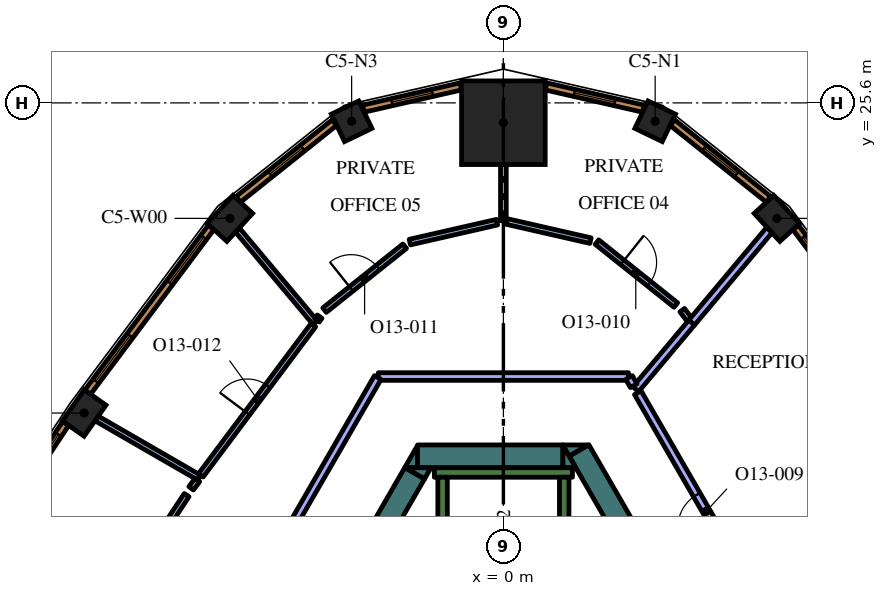
"""IFC4 building model, lengths in metres.
Left out: names, types, materials, properties, quantities, classifications, styles, units other than length and angle.
Written with IfcOpenShell. Run it as: python <this file> out.ifc"""

import sys

from ifc_helpers import new_model, si_unit, direction, frame, frame_2d, origin, origin_2d, place, context, subcontext, project, spatial, polyline, rectangle, outline, extrude, element, fill, save


model = new_model("IFC4")
c1 = context("Model", 3, precision=1e-05, world=origin(), true_north=direction((0.0, 1.0)))
c2 = subcontext(c1, "Body", "Model", "MODEL_VIEW")
j1 = project(units=[si_unit("LENGTHUNIT", "METRE"), si_unit("PLANEANGLEUNIT", "RADIAN")], contexts=[c1])
p1 = place(None, origin())
s1 = spatial("IfcSite", under=j1, at=p1, CompositionType="ELEMENT")
p2 = place(p1, origin())
s2 = spatial("IfcBuilding", under=s1, at=p2, CompositionType="ELEMENT")
p3 = place(p2, frame((0.0, 0.0, 292.2)))
s3 = spatial("IfcBuildingStorey", under=s2, at=p3, CompositionType="ELEMENT", Elevation=292.2)
p4 = place(p3, frame((0.0, 25.078, 0.0), z_axis=(0.0, 0.0, 1.0), x_axis=(0.0, 1.0, 0.0)))
e1 = element("IfcColumn", 1, at=p4, inside=s3, PredefinedType="COLUMN", context=c2, shape_type="SweptSolid", body=[
    extrude(rectangle(XDim=2.2, YDim=2.2, at=origin_2d()), origin(), (0.0, 0.0, 1.0), 4.2),
])
p5 = place(p3, frame((7.195, 22.561, 0.0), z_axis=(0.0, 0.0, 1.0), x_axis=(-0.67580250023, 0.737082750228, 0.0)))
e2 = element("IfcColumn", 2, at=p5, inside=s3, PredefinedType="COLUMN", context=c2, shape_type="SweptSolid", body=[
    extrude(rectangle(XDim=1.0, YDim=0.7, at=origin_2d()), origin(), (0.0, 0.0, 1.0), 4.2),
])
for number, where, z_axis, x_axis in (
    (3, (3.993, 25.116, 0.0), (0.0, 0.0, 1.0), (-0.901, 0.434, 0.0)),
    (4, (-3.993, 25.116, 0.0), (0.0, 0.0, 1.0), (-0.901, -0.434, 0.0)),
):
    element("IfcColumn", number, at=place(p3, frame(where, z_axis=z_axis, x_axis=x_axis)), inside=s3, PredefinedType="COLUMN", context=c2, shape_type="SweptSolid", body=[
        extrude(rectangle(XDim=0.8, YDim=0.8, at=origin_2d()), origin(), (0.0, 0.0, 1.0), 4.2),
    ])
for number, where, z_axis, x_axis in (
    (5, (-7.195, 22.561, 0.0), (0.0, 0.0, 1.0), (-0.676, -0.737, 0.0)),
    (6, (-11.032, 17.44, 0.0), (0.0, 0.0, 1.0), (-0.575, -0.818, 0.0)),
):
    element("IfcColumn", number, at=place(p3, frame(where, z_axis=z_axis, x_axis=x_axis)), inside=s3, PredefinedType="COLUMN", context=c2, shape_type="SweptSolid", body=[
        extrude(rectangle(XDim=1.0, YDim=0.7, at=origin_2d()), origin(), (0.0, 0.0, 1.0), 4.2),
    ])
p6 = place(p3, frame((1.989, 16.456, 0.0), z_axis=(0.0, 0.0, 1.0), x_axis=(0.49999102663, -0.8660305845, 0.0)))
e7 = element("IfcWall", 7, at=p6, inside=s3, PredefinedType="SOLIDWALL", context=c2, shape_type="SweptSolid", body=[
    extrude(rectangle(XDim=12.406, YDim=0.6, at=frame_2d((6.203, 0.0))), origin(), (0.0, 0.0, 1.0), 4.2),
])
p7 = place(p3, origin())
e8 = element("IfcWall", 8, at=p7, inside=s3, PredefinedType="SOLIDWALL", context=c2, shape_type="SweptSolid", body=[
    extrude(outline(polyline([(1.559, 16.6), (2.235, 16.6), (1.728, 16.307), (1.559, 16.6)])), origin(), (0.0, 0.0, 1.0), 4.2),
])
p8 = place(p3, frame((-2.258, 16.3, 0.0), z_axis=(0.0, 0.0, 1.0), x_axis=(1.0, 0.0, 0.0)))
e9 = element("IfcWall", 9, at=p8, inside=s3, PredefinedType="SOLIDWALL", context=c2, shape_type="SweptSolid", body=[
    extrude(rectangle(XDim=3.823, YDim=0.6, at=frame_2d((1.912, 0.0))), origin(), (0.0, 0.0, 1.0), 4.2),
])
e10 = element("IfcWall", 10, at=p7, inside=s3, PredefinedType="SOLIDWALL", context=c2, shape_type="SweptSolid", body=[
    extrude(outline(polyline([(1.905, 16.0), (1.567, 16.0), (1.567, 16.585), (1.905, 16.0)])), origin(), (0.0, 0.0, 1.0), 4.2),
])
e11 = element("IfcWall", 11, at=p7, inside=s3, PredefinedType="SOLIDWALL", context=c2, shape_type="SweptSolid", body=[
    extrude(outline(polyline([(-2.598, 16.0), (-2.26, 16.585), (-2.26, 16.0), (-2.598, 16.0)])), origin(), (0.0, 0.0, 1.0), 4.2),
])
p9 = place(p3, frame((-2.335, 15.855, 0.0), z_axis=(0.0, 0.0, 1.0), x_axis=(-0.499960127962, -0.866048422692, 0.0)))
e12 = element("IfcWall", 12, at=p9, inside=s3, PredefinedType="SOLIDWALL", context=c2, shape_type="SweptSolid", body=[
    extrude(rectangle(XDim=2.934, YDim=0.6, at=frame_2d((1.467, 0.0))), origin(), (0.0, 0.0, 1.0), 4.2),
])
e13 = element("IfcWall", 13, at=p7, inside=s3, PredefinedType="SOLIDWALL", context=c2, shape_type="SweptSolid", body=[
    extrude(outline(polyline([(-1.905, 16.0), (-2.074, 15.707), (-2.581, 16.0), (-1.905, 16.0)])), origin(), (0.0, 0.0, 1.0), 4.2),
])
p10 = place(p3, frame((-1.817, 15.875, 0.0), z_axis=(0.0, 0.0, 1.0), x_axis=(1.0, 0.0, 0.0)))
e14 = element("IfcWall", 14, at=p10, inside=s3, PredefinedType="SOLIDWALL", context=c2, shape_type="SweptSolid", body=[
    extrude(rectangle(XDim=3.634, YDim=0.25, at=frame_2d((1.817, 0.0))), origin(), (0.0, 0.0, 1.0), 4.2),
])
p11 = place(p3, frame((1.6, 8.95, 0.0), z_axis=(0.0, 0.0, 1.0), x_axis=(0.0, 1.0, 0.0)))
e15 = element("IfcWall", 15, at=p11, inside=s3, PredefinedType="SOLIDWALL", context=c2, shape_type="SweptSolid", body=[
    extrude(rectangle(XDim=6.8, YDim=0.25, at=frame_2d((3.4, 0.0))), origin(), (0.0, 0.0, 1.0), 4.2),
])
p12 = place(p3, frame((-1.6, 8.7, 0.0), z_axis=(0.0, 0.0, 1.0), x_axis=(0.0, 1.0, 0.0)))
e16 = element("IfcWall", 16, at=p12, inside=s3, PredefinedType="SOLIDWALL", context=c2, shape_type="SweptSolid", body=[
    extrude(rectangle(XDim=7.05, YDim=0.25, at=frame_2d((3.525, 0.0))), origin(), (0.0, 0.0, 1.0), 4.2),
])
p13 = place(p3, frame((4.95, 19.814, 0.0), z_axis=(0.0, 0.0, 1.0), x_axis=(0.642981953866, 0.765881326971, 0.0)))
e17 = element("IfcWall", 17, at=p13, inside=s3, PredefinedType="PARTITIONING", context=c2, shape_type="SweptSolid", body=[
    extrude(rectangle(XDim=3.188, YDim=0.2, at=frame_2d((1.594, 0.0))), origin(), (0.0, 0.0, 1.0), 3.55),
])
p14 = place(p3, frame((3.483, 18.067, 0.0), z_axis=(0.0, 0.0, 1.0), x_axis=(0.642896944312, 0.765952687177, 0.0)))
e18 = element("IfcWall", 18, at=p14, inside=s3, PredefinedType="PARTITIONING", context=c2, shape_type="SweptSolid", body=[
    extrude(rectangle(XDim=2.29, YDim=0.2, at=frame_2d((1.145, 0.0))), origin(), (0.0, 0.0, 1.0), 3.55),
])
p15 = place(p3, frame((7.188, 11.65, 0.0), z_axis=(0.0, 0.0, 1.0), x_axis=(-0.499989634868, 0.866031388014, 0.0)))
e19 = element("IfcWall", 19, at=p15, inside=s3, PredefinedType="PARTITIONING", context=c2, shape_type="SweptSolid", body=[
    extrude(rectangle(XDim=7.303, YDim=0.2, at=frame_2d((3.652, 0.0))), origin(), (0.0, 0.0, 1.0), 3.55),
])
p16 = place(p15, frame((3.2, 0.0, 0.0)))
e20 = element("IfcOpeningElement", 20, at=p16, cuts=e19, PredefinedType="OPENING", context=c2, shape_type="SweptSolid", body=[
    extrude(rectangle(XDim=1.0, YDim=2.1, at=frame_2d((0.5, 1.05))), frame((0.0, 0.11, 0.0), z_axis=(0.0, -1.0, 0.0), x_axis=(1.0, 0.0, 0.0)), (0.0, 0.0, 1.0), 0.22),
])
p17 = place(p3, frame((0.0, 22.5, 0.0), z_axis=(0.0, 0.0, 1.0), x_axis=(0.0, 1.0, 0.0)))
e21 = element("IfcWall", 21, at=p17, inside=s3, PredefinedType="PARTITIONING", context=c2, shape_type="SweptSolid", body=[
    extrude(rectangle(XDim=1.479, YDim=0.15, at=frame_2d((0.739, 0.0))), origin(), (0.0, 0.0, 1.0), 3.55),
])
p18 = place(p3, frame((4.891, 19.899, 0.0), z_axis=(0.0, 0.0, 1.0), x_axis=(-0.6, 0.8, 0.0)))
e22 = element("IfcWall", 22, at=p18, inside=s3, PredefinedType="PARTITIONING", context=c2, shape_type="SweptSolid", body=[
    extrude(rectangle(XDim=0.309, YDim=0.15, at=frame_2d((0.154, 0.0))), origin(), (0.0, 0.0, 1.0), 3.55),
])
p19 = place(p3, frame((2.462, 21.937, 0.0), z_axis=(0.0, 0.0, 1.0), x_axis=(0.781630346222, -0.62374193531, 0.0)))
e23 = element("IfcWall", 23, at=p19, inside=s3, PredefinedType="PARTITIONING", context=c2, shape_type="SweptSolid", body=[
    extrude(rectangle(XDim=2.656, YDim=0.15, at=frame_2d((1.328, 0.0))), origin(), (0.0, 0.0, 1.0), 3.55),
])
p20 = place(p19, frame((0.857, 0.0, 0.0)))
e24 = element("IfcOpeningElement", 24, at=p20, cuts=e23, PredefinedType="OPENING", context=c2, shape_type="SweptSolid", body=[
    extrude(rectangle(XDim=0.9, YDim=2.1, at=frame_2d((0.45, 1.05))), frame((0.0, 0.085, 0.0), z_axis=(0.0, -1.0, 0.0), x_axis=(1.0, 0.0, 0.0)), (0.0, 0.0, 1.0), 0.17),
])
p21 = place(p3, frame((2.293, 21.976, 0.0), z_axis=(0.0, 0.0, 1.0), x_axis=(-0.974905760283, 0.22261796551, 0.0)))
e25 = element("IfcWall", 25, at=p21, inside=s3, PredefinedType="PARTITIONING", context=c2, shape_type="SweptSolid", body=[
    extrude(rectangle(XDim=2.276, YDim=0.15, at=frame_2d((1.138, 0.0))), origin(), (0.0, 0.0, 1.0), 3.55),
])
p22 = place(p3, frame((-4.952, 19.817, 0.0), z_axis=(0.0, 0.0, 1.0), x_axis=(-0.643023053688, 0.765846820471, 0.0)))
e26 = element("IfcWall", 26, at=p22, inside=s3, PredefinedType="PARTITIONING", context=c2, shape_type="SweptSolid", body=[
    extrude(rectangle(XDim=3.184, YDim=0.15, at=frame_2d((1.592, 0.0))), origin(), (0.0, 0.0, 1.0), 3.55),
])
p23 = place(p3, frame((-0.168, 22.461, 0.0), z_axis=(0.0, 0.0, 1.0), x_axis=(-0.974885550769, -0.222706450069, 0.0)))
e27 = element("IfcWall", 27, at=p23, inside=s3, PredefinedType="PARTITIONING", context=c2, shape_type="SweptSolid", body=[
    extrude(rectangle(XDim=2.353, YDim=0.15, at=frame_2d((1.176, 0.0))), origin(), (0.0, 0.0, 1.0), 3.55),
])
p24 = place(p3, frame((-4.706, 20.146, 0.0), z_axis=(0.0, 0.0, 1.0), x_axis=(0.781592149204, 0.623789798172, 0.0)))
e28 = element("IfcWall", 28, at=p24, inside=s3, PredefinedType="PARTITIONING", context=c2, shape_type="SweptSolid", body=[
    extrude(rectangle(XDim=2.698, YDim=0.15, at=frame_2d((1.349, 0.0))), origin(), (0.0, 0.0, 1.0), 3.55),
])
p25 = place(p24, frame((0.898, 0.0, 0.0)))
e29 = element("IfcOpeningElement", 29, at=p25, cuts=e28, PredefinedType="OPENING", context=c2, shape_type="SweptSolid", body=[
    extrude(rectangle(XDim=0.9, YDim=2.1, at=frame_2d((0.45, 1.05))), frame((0.0, 0.085, 0.0), z_axis=(0.0, -1.0, 0.0), x_axis=(1.0, 0.0, 0.0)), (0.0, 0.0, 1.0), 0.17),
])
p26 = place(p3, frame((-4.834, 19.975, 0.0), z_axis=(0.0, 0.0, 1.0), x_axis=(-0.599349659863, -0.800487342325, 0.0)))
e30 = element("IfcWall", 30, at=p26, inside=s3, PredefinedType="PARTITIONING", context=c2, shape_type="SweptSolid", body=[
    extrude(rectangle(XDim=0.12, YDim=0.15, at=frame_2d((0.06, 0.0))), origin(), (0.0, 0.0, 1.0), 3.55),
])
p27 = place(p3, frame((-8.007, 15.74, 0.0), z_axis=(0.0, 0.0, 1.0), x_axis=(-0.866044607523, 0.499966736674, 0.0)))
e31 = element("IfcWall", 31, at=p27, inside=s3, PredefinedType="PARTITIONING", context=c2, shape_type="SweptSolid", body=[
    extrude(rectangle(XDim=3.115, YDim=0.15, at=frame_2d((1.557, 0.0))), origin(), (0.0, 0.0, 1.0), 3.55),
])
p28 = place(p3, frame((-7.962, 15.8, 0.0), z_axis=(0.0, 0.0, 1.0), x_axis=(0.599541489613, 0.800343677574, 0.0)))
e32 = element("IfcWall", 32, at=p28, inside=s3, PredefinedType="PARTITIONING", context=c2, shape_type="SweptSolid", body=[
    extrude(rectangle(XDim=4.942, YDim=0.15, at=frame_2d((2.471, 0.0))), origin(), (0.0, 0.0, 1.0), 3.55),
])
p29 = place(p28, frame((2.042, 0.0, 0.0)))
e33 = element("IfcOpeningElement", 33, at=p29, cuts=e32, PredefinedType="OPENING", context=c2, shape_type="SweptSolid", body=[
    extrude(rectangle(XDim=0.9, YDim=2.1, at=frame_2d((0.45, 1.05))), frame((0.0, 0.085, 0.0), z_axis=(0.0, -1.0, 0.0), x_axis=(1.0, 0.0, 0.0)), (0.0, 0.0, 1.0), 0.17),
])
p30 = place(p3, frame((-8.052, 15.679, 0.0), z_axis=(0.0, 0.0, 1.0), x_axis=(-0.599004157744, -0.800745914136, 0.0)))
e34 = element("IfcWall", 34, at=p30, inside=s3, PredefinedType="PARTITIONING", context=c2, shape_type="SweptSolid", body=[
    extrude(rectangle(XDim=0.275, YDim=0.15, at=frame_2d((0.137, 0.0))), origin(), (0.0, 0.0, 1.0), 3.55),
])
p31 = place(p3, frame((-11.523, 10.449, 0.0), z_axis=(0.0, 0.0, 1.0), x_axis=(0.550751709023, 0.834669129061, 0.0)))
e35 = element("IfcWall", 35, at=p31, inside=s3, PredefinedType="PARTITIONING", context=c2, shape_type="SweptSolid", body=[
    extrude(rectangle(XDim=5.788, YDim=0.15, at=frame_2d((2.894, 0.0))), origin(), (0.0, 0.0, 1.0), 3.55),
])
p32 = place(p31, frame((2.488, 0.0, 0.0)))
e36 = element("IfcOpeningElement", 36, at=p32, cuts=e35, PredefinedType="OPENING", context=c2, shape_type="SweptSolid", body=[
    extrude(rectangle(XDim=0.9, YDim=2.1, at=frame_2d((0.45, 1.05))), frame((0.0, 0.085, 0.0), z_axis=(0.0, -1.0, 0.0), x_axis=(1.0, 0.0, 0.0)), (0.0, 0.0, 1.0), 0.17),
])
p33 = place(p3, frame((3.291, 18.4, 0.0), z_axis=(0.0, 0.0, 1.0), x_axis=(-1.0, 0.0, 0.0)))
e37 = element("IfcWall", 37, at=p33, inside=s3, PredefinedType="PARTITIONING", context=c2, shape_type="SweptSolid", body=[
    extrude(rectangle(XDim=6.582, YDim=0.2, at=frame_2d((3.291, 0.0))), origin(), (0.0, 0.0, 1.0), 3.55),
])
p34 = place(p3, frame((-3.306, 18.374, 0.0), z_axis=(0.0, 0.0, 1.0), x_axis=(-0.499999798456, -0.866025520146, 0.0)))
e38 = element("IfcWall", 38, at=p34, inside=s3, PredefinedType="PARTITIONING", context=c2, shape_type="SweptSolid", body=[
    extrude(rectangle(XDim=8.229, YDim=0.2, at=frame_2d((4.115, 0.0))), origin(), (0.0, 0.0, 1.0), 3.55),
])
p35 = place(p3, frame((3.43, 18.159, 0.0), z_axis=(0.0, 0.0, 1.0), x_axis=(-0.499949632511, 0.866054481515, 0.0)))
e39 = element("IfcWall", 39, at=p35, inside=s3, PredefinedType="PARTITIONING", context=c2, shape_type="SweptSolid", body=[
    extrude(rectangle(XDim=0.248, YDim=0.2, at=frame_2d((0.124, 0.0))), origin(), (0.0, 0.0, 1.0), 3.55),
])
p36 = place(p3, frame((10.938, 17.99, 0.0), z_axis=(0.0, 0.0, 1.0), x_axis=(-0.599559865294, 0.800329911929, 0.0)))
e40 = element("IfcWall", 40, at=p36, inside=s3, PredefinedType="SOLIDWALL", context=c2, shape_type="SweptSolid", body=[
    extrude(rectangle(XDim=5.415, YDim=0.19, at=frame_2d((2.708, 0.0))), origin(), (0.0, 0.0, 1.0), 3.95),
])
p37 = place(p36, frame((0.358, 0.0, 0.6)))
e41 = element("IfcOpeningElement", 41, at=p37, cuts=e40, PredefinedType="OPENING", context=c2, shape_type="SweptSolid", body=[
    extrude(rectangle(XDim=1.5, YDim=2.85, at=frame_2d((0.75, 1.425))), frame((0.0, 0.105, 0.0), z_axis=(0.0, -1.0, 0.0), x_axis=(1.0, 0.0, 0.0)), (0.0, 0.0, 1.0), 0.21),
])
p38 = place(p36, frame((3.593, 0.0, 0.6)))
e42 = element("IfcOpeningElement", 42, at=p38, cuts=e40, PredefinedType="OPENING", context=c2, shape_type="SweptSolid", body=[
    extrude(rectangle(XDim=1.5, YDim=2.85, at=frame_2d((0.75, 1.425))), frame((0.0, 0.105, 0.0), z_axis=(0.0, -1.0, 0.0), x_axis=(1.0, 0.0, 0.0)), (0.0, 0.0, 1.0), 0.21),
])
p39 = place(p3, frame((6.977, 23.061, 0.0), z_axis=(0.0, 0.0, 1.0), x_axis=(-0.781626234064, 0.623747088349, 0.0)))
e43 = element("IfcWall", 43, at=p39, inside=s3, PredefinedType="SOLIDWALL", context=c2, shape_type="SweptSolid", body=[
    extrude(rectangle(XDim=3.237, YDim=0.19, at=frame_2d((1.618, 0.0))), origin(), (0.0, 0.0, 1.0), 3.95),
])
p40 = place(p39, frame((1.068, 0.0, 0.6)))
e44 = element("IfcOpeningElement", 44, at=p40, cuts=e43, PredefinedType="OPENING", context=c2, shape_type="SweptSolid", body=[
    extrude(rectangle(XDim=1.1, YDim=2.85, at=frame_2d((0.55, 1.425))), frame((0.0, 0.105, 0.0), z_axis=(0.0, -1.0, 0.0), x_axis=(1.0, 0.0, 0.0)), (0.0, 0.0, 1.0), 0.21),
])
p41 = place(p3, frame((3.683, 25.449, 0.0), z_axis=(0.0, 0.0, 1.0), x_axis=(-0.974913273386, 0.222585060988, 0.0)))
e45 = element("IfcWall", 45, at=p41, inside=s3, PredefinedType="SOLIDWALL", context=c2, shape_type="SweptSolid", body=[
    extrude(rectangle(XDim=2.627, YDim=0.19, at=frame_2d((1.313, 0.0))), origin(), (0.0, 0.0, 1.0), 3.95),
])
p42 = place(p41, frame((0.763, 0.0, 0.6)))
e46 = element("IfcOpeningElement", 46, at=p42, cuts=e45, PredefinedType="OPENING", context=c2, shape_type="SweptSolid", body=[
    extrude(rectangle(XDim=1.1, YDim=2.85, at=frame_2d((0.55, 1.425))), frame((0.0, 0.105, 0.0), z_axis=(0.0, -1.0, 0.0), x_axis=(1.0, 0.0, 0.0)), (0.0, 0.0, 1.0), 0.21),
])
p43 = place(p3, frame((-1.122, 26.033, 0.0), z_axis=(0.0, 0.0, 1.0), x_axis=(-0.974913273386, -0.222585060988, 0.0)))
e47 = element("IfcWall", 47, at=p43, inside=s3, PredefinedType="SOLIDWALL", context=c2, shape_type="SweptSolid", body=[
    extrude(rectangle(XDim=2.627, YDim=0.19, at=frame_2d((1.313, 0.0))), origin(), (0.0, 0.0, 1.0), 3.95),
])
p44 = place(p43, frame((0.763, 0.0, 0.6)))
e48 = element("IfcOpeningElement", 48, at=p44, cuts=e47, PredefinedType="OPENING", context=c2, shape_type="SweptSolid", body=[
    extrude(rectangle(XDim=1.1, YDim=2.85, at=frame_2d((0.55, 1.425))), frame((0.0, 0.105, 0.0), z_axis=(0.0, -1.0, 0.0), x_axis=(1.0, 0.0, 0.0)), (0.0, 0.0, 1.0), 0.21),
])
p45 = place(p3, frame((-4.448, 25.08, 0.0), z_axis=(0.0, 0.0, 1.0), x_axis=(-0.781626234064, -0.623747088349, 0.0)))
e49 = element("IfcWall", 49, at=p45, inside=s3, PredefinedType="SOLIDWALL", context=c2, shape_type="SweptSolid", body=[
    extrude(rectangle(XDim=3.237, YDim=0.19, at=frame_2d((1.618, 0.0))), origin(), (0.0, 0.0, 1.0), 3.95),
])
p46 = place(p45, frame((1.068, 0.0, 0.6)))
e50 = element("IfcOpeningElement", 50, at=p46, cuts=e49, PredefinedType="OPENING", context=c2, shape_type="SweptSolid", body=[
    extrude(rectangle(XDim=1.1, YDim=2.85, at=frame_2d((0.55, 1.425))), frame((0.0, 0.105, 0.0), z_axis=(0.0, -1.0, 0.0), x_axis=(1.0, 0.0, 0.0)), (0.0, 0.0, 1.0), 0.21),
])
p47 = place(p3, frame((-7.692, 22.324, 0.0), z_axis=(0.0, 0.0, 1.0), x_axis=(-0.599559865294, -0.800329911929, 0.0)))
e51 = element("IfcWall", 51, at=p47, inside=s3, PredefinedType="SOLIDWALL", context=c2, shape_type="SweptSolid", body=[
    extrude(rectangle(XDim=5.415, YDim=0.19, at=frame_2d((2.708, 0.0))), origin(), (0.0, 0.0, 1.0), 3.95),
])
p48 = place(p47, frame((0.323, 0.0, 0.6)))
e52 = element("IfcOpeningElement", 52, at=p48, cuts=e51, PredefinedType="OPENING", context=c2, shape_type="SweptSolid", body=[
    extrude(rectangle(XDim=1.5, YDim=2.85, at=frame_2d((0.75, 1.425))), frame((0.0, 0.105, 0.0), z_axis=(0.0, -1.0, 0.0), x_axis=(1.0, 0.0, 0.0)), (0.0, 0.0, 1.0), 0.21),
])
p49 = place(p47, frame((3.558, 0.0, 0.6)))
e53 = element("IfcOpeningElement", 53, at=p49, cuts=e51, PredefinedType="OPENING", context=c2, shape_type="SweptSolid", body=[
    extrude(rectangle(XDim=1.5, YDim=2.85, at=frame_2d((0.75, 1.425))), frame((0.0, 0.105, 0.0), z_axis=(0.0, -1.0, 0.0), x_axis=(1.0, 0.0, 0.0)), (0.0, 0.0, 1.0), 0.21),
])
p50 = place(p3, frame((-11.518, 17.166, 0.0), z_axis=(0.0, 0.0, 1.0), x_axis=(-0.550744054781, -0.83467417962, 0.0)))
e54 = element("IfcWall", 54, at=p50, inside=s3, PredefinedType="SOLIDWALL", context=c2, shape_type="SweptSolid", body=[
    extrude(rectangle(XDim=5.406, YDim=0.19, at=frame_2d((2.703, 0.0))), origin(), (0.0, 0.0, 1.0), 3.95),
])
p51 = place(p50, frame((0.346, 0.0, 0.6)))
e55 = element("IfcOpeningElement", 55, at=p51, cuts=e54, PredefinedType="OPENING", context=c2, shape_type="SweptSolid", body=[
    extrude(rectangle(XDim=1.5, YDim=2.85, at=frame_2d((0.75, 1.425))), frame((0.0, 0.105, 0.0), z_axis=(0.0, -1.0, 0.0), x_axis=(1.0, 0.0, 0.0)), (0.0, 0.0, 1.0), 0.21),
])
p52 = place(p50, frame((3.559, 0.0, 0.6)))
e56 = element("IfcOpeningElement", 56, at=p52, cuts=e54, PredefinedType="OPENING", context=c2, shape_type="SweptSolid", body=[
    extrude(rectangle(XDim=1.5, YDim=2.85, at=frame_2d((0.75, 1.425))), frame((0.0, 0.105, 0.0), z_axis=(0.0, -1.0, 0.0), x_axis=(1.0, 0.0, 0.0)), (0.0, 0.0, 1.0), 0.21),
])
p53 = place(p16, origin())
e57 = element("IfcDoor", 57, at=p53, inside=s3, OperationType="SINGLE_SWING_RIGHT", PredefinedType="DOOR", context=c2, shape_type="SweptSolid", body=[
    extrude(rectangle(XDim=1.0, YDim=2.1, at=frame_2d((0.5, 1.05))), frame((0.0, 0.025, 0.0), z_axis=(0.0, -1.0, 0.0), x_axis=(1.0, 0.0, 0.0)), (0.0, 0.0, 1.0), 0.05),
])
fill(e20, e57)
p54 = place(p20, origin())
e58 = element("IfcDoor", 58, at=p54, inside=s3, OperationType="SINGLE_SWING_LEFT", PredefinedType="DOOR", context=c2, shape_type="SweptSolid", body=[
    extrude(rectangle(XDim=0.9, YDim=2.1, at=frame_2d((0.45, 1.05))), frame((0.0, 0.025, 0.0), z_axis=(0.0, -1.0, 0.0), x_axis=(1.0, 0.0, 0.0)), (0.0, 0.0, 1.0), 0.05),
])
fill(e24, e58)
p55 = place(p25, origin())
e59 = element("IfcDoor", 59, at=p55, inside=s3, OperationType="SINGLE_SWING_LEFT", PredefinedType="DOOR", context=c2, shape_type="SweptSolid", body=[
    extrude(rectangle(XDim=0.9, YDim=2.1, at=frame_2d((0.45, 1.05))), frame((0.0, 0.025, 0.0), z_axis=(0.0, -1.0, 0.0), x_axis=(1.0, 0.0, 0.0)), (0.0, 0.0, 1.0), 0.05),
])
fill(e29, e59)
p56 = place(p29, origin())
e60 = element("IfcDoor", 60, at=p56, inside=s3, OperationType="SINGLE_SWING_RIGHT", PredefinedType="DOOR", context=c2, shape_type="SweptSolid", body=[
    extrude(rectangle(XDim=0.9, YDim=2.1, at=frame_2d((0.45, 1.05))), frame((0.0, 0.025, 0.0), z_axis=(0.0, -1.0, 0.0), x_axis=(1.0, 0.0, 0.0)), (0.0, 0.0, 1.0), 0.05),
])
fill(e33, e60)
p57 = place(p38, origin())
e61 = element("IfcWindow", 61, at=p57, inside=s3, PartitioningType="SINGLE_PANEL", PredefinedType="WINDOW", context=c2, shape_type="SweptSolid", body=[
    extrude(rectangle(XDim=1.5, YDim=2.85, at=frame_2d((0.75, 1.425))), frame((0.0, 0.045, 0.0), z_axis=(0.0, -1.0, 0.0), x_axis=(1.0, 0.0, 0.0)), (0.0, 0.0, 1.0), 0.06),
])
fill(e42, e61)
p58 = place(p40, origin())
e62 = element("IfcWindow", 62, at=p58, inside=s3, PartitioningType="SINGLE_PANEL", PredefinedType="WINDOW", context=c2, shape_type="SweptSolid", body=[
    extrude(rectangle(XDim=1.1, YDim=2.85, at=frame_2d((0.55, 1.425))), frame((0.0, 0.045, 0.0), z_axis=(0.0, -1.0, 0.0), x_axis=(1.0, 0.0, 0.0)), (0.0, 0.0, 1.0), 0.06),
])
fill(e44, e62)
p59 = place(p42, origin())
e63 = element("IfcWindow", 63, at=p59, inside=s3, PartitioningType="SINGLE_PANEL", PredefinedType="WINDOW", context=c2, shape_type="SweptSolid", body=[
    extrude(rectangle(XDim=1.1, YDim=2.85, at=frame_2d((0.55, 1.425))), frame((0.0, 0.045, 0.0), z_axis=(0.0, -1.0, 0.0), x_axis=(1.0, 0.0, 0.0)), (0.0, 0.0, 1.0), 0.06),
])
fill(e46, e63)
p60 = place(p44, origin())
e64 = element("IfcWindow", 64, at=p60, inside=s3, PartitioningType="SINGLE_PANEL", PredefinedType="WINDOW", context=c2, shape_type="SweptSolid", body=[
    extrude(rectangle(XDim=1.1, YDim=2.85, at=frame_2d((0.55, 1.425))), frame((0.0, 0.045, 0.0), z_axis=(0.0, -1.0, 0.0), x_axis=(1.0, 0.0, 0.0)), (0.0, 0.0, 1.0), 0.06),
])
fill(e48, e64)
p61 = place(p46, origin())
e65 = element("IfcWindow", 65, at=p61, inside=s3, PartitioningType="SINGLE_PANEL", PredefinedType="WINDOW", context=c2, shape_type="SweptSolid", body=[
    extrude(rectangle(XDim=1.1, YDim=2.85, at=frame_2d((0.55, 1.425))), frame((0.0, 0.045, 0.0), z_axis=(0.0, -1.0, 0.0), x_axis=(1.0, 0.0, 0.0)), (0.0, 0.0, 1.0), 0.06),
])
fill(e50, e65)
p62 = place(p48, origin())
e66 = element("IfcWindow", 66, at=p62, inside=s3, PartitioningType="SINGLE_PANEL", PredefinedType="WINDOW", context=c2, shape_type="SweptSolid", body=[
    extrude(rectangle(XDim=1.5, YDim=2.85, at=frame_2d((0.75, 1.425))), frame((0.0, 0.045, 0.0), z_axis=(0.0, -1.0, 0.0), x_axis=(1.0, 0.0, 0.0)), (0.0, 0.0, 1.0), 0.06),
])
fill(e52, e66)
p63 = place(p49, origin())
e67 = element("IfcWindow", 67, at=p63, inside=s3, PartitioningType="SINGLE_PANEL", PredefinedType="WINDOW", context=c2, shape_type="SweptSolid", body=[
    extrude(rectangle(XDim=1.5, YDim=2.85, at=frame_2d((0.75, 1.425))), frame((0.0, 0.045, 0.0), z_axis=(0.0, -1.0, 0.0), x_axis=(1.0, 0.0, 0.0)), (0.0, 0.0, 1.0), 0.06),
])
fill(e53, e67)
p64 = place(p51, origin())
e68 = element("IfcWindow", 68, at=p64, inside=s3, PartitioningType="SINGLE_PANEL", PredefinedType="WINDOW", context=c2, shape_type="SweptSolid", body=[
    extrude(rectangle(XDim=1.5, YDim=2.85, at=frame_2d((0.75, 1.425))), frame((0.0, 0.045, 0.0), z_axis=(0.0, -1.0, 0.0), x_axis=(1.0, 0.0, 0.0)), (0.0, 0.0, 1.0), 0.06),
])
fill(e55, e68)
save(model, sys.argv[1])
